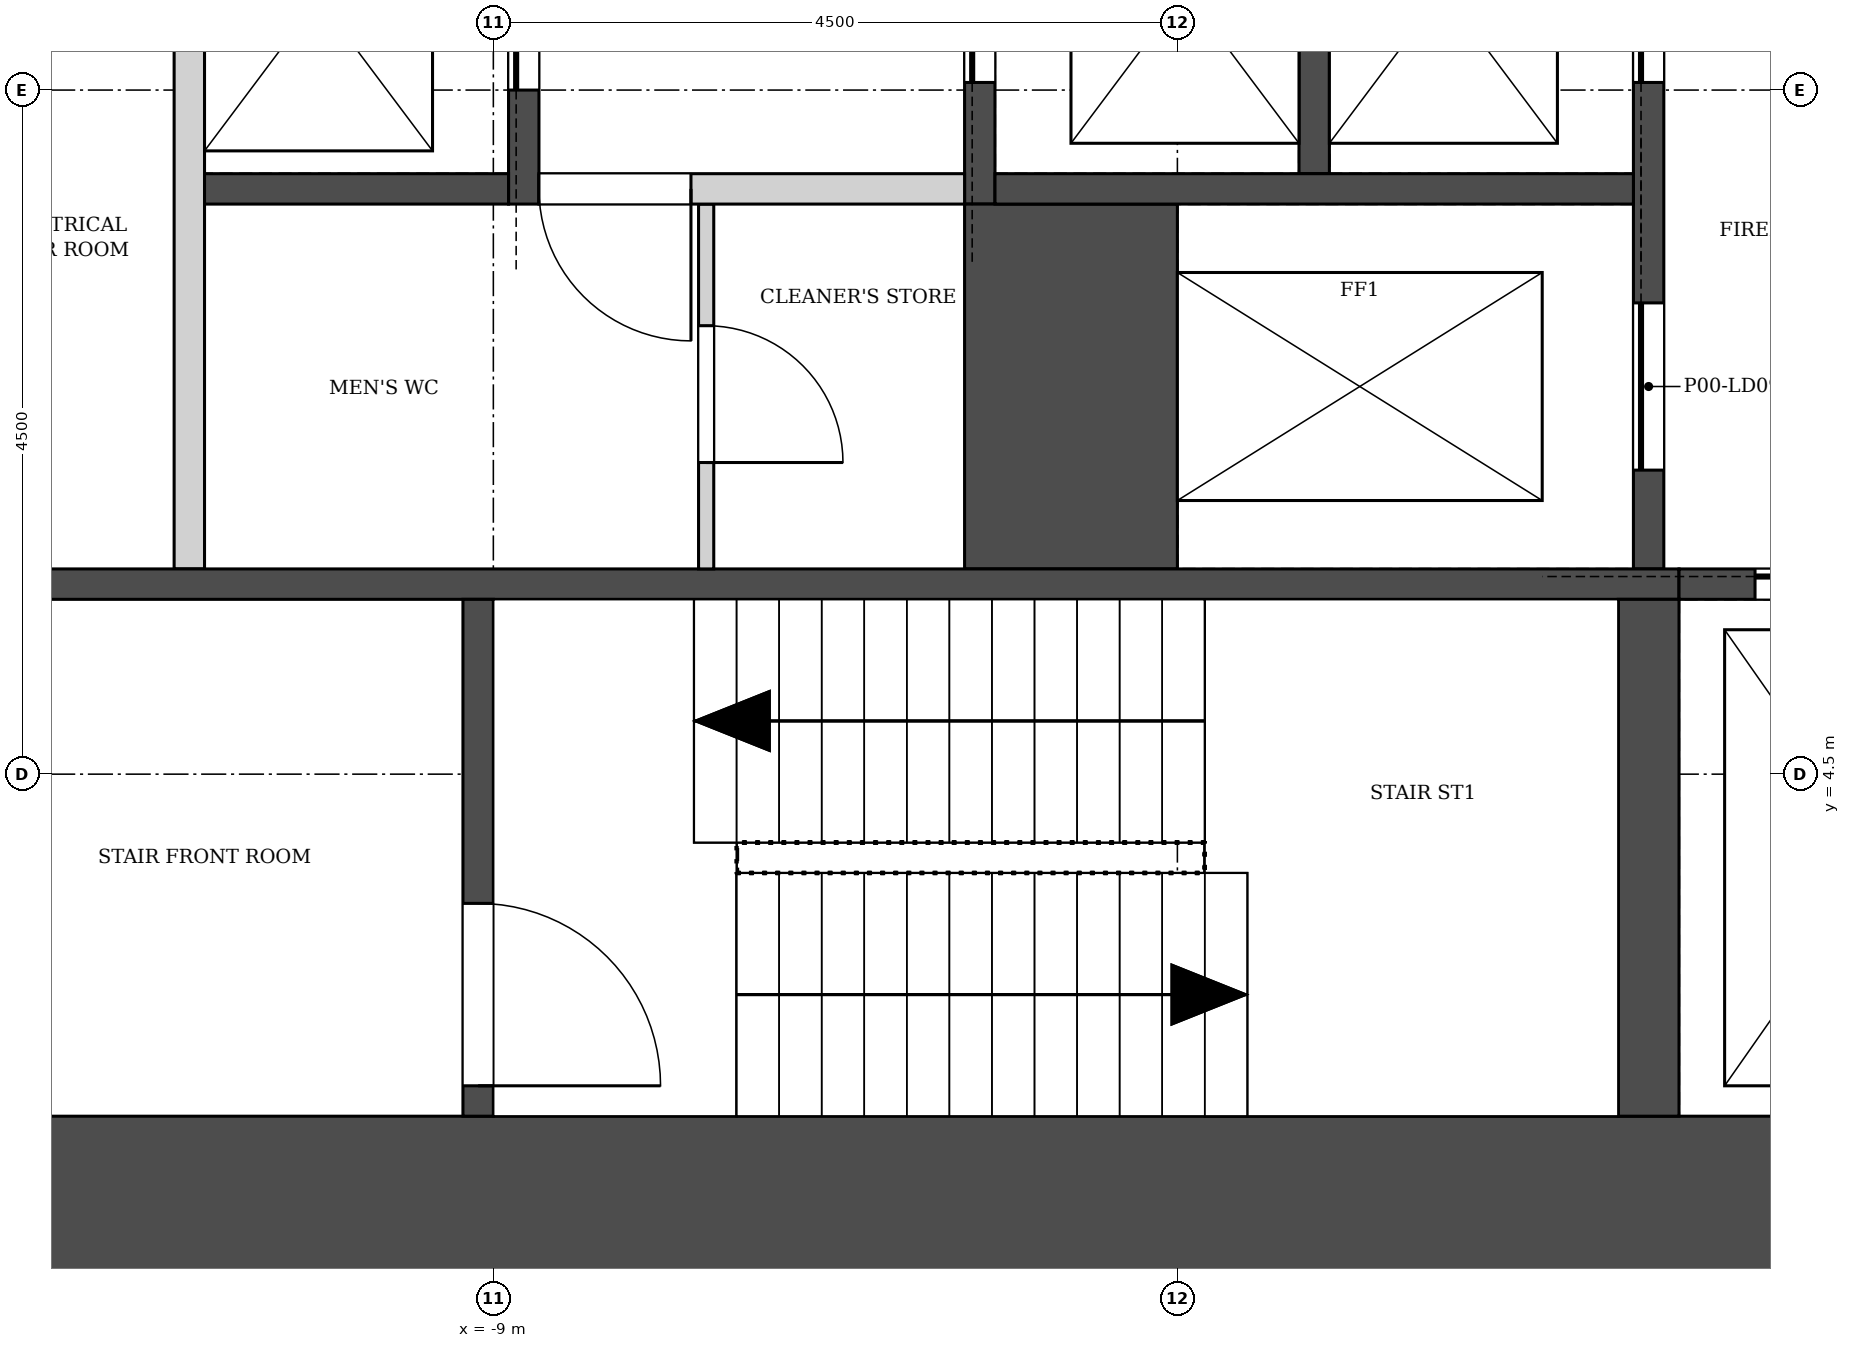
"""IFC4 building model, lengths in metres.
Left out: names, types, materials, properties, quantities, classifications, styles, units other than length and angle.
Written with IfcOpenShell. Run it as: python <this file> out.ifc"""

import sys

from ifc_helpers import new_model, si_unit, direction, frame, frame_2d, origin, place, context, subcontext, project, spatial, rectangle, extrude, element, fill, save


model = new_model("IFC4")
c1 = context("Model", 3, precision=1e-05, world=origin(), true_north=direction((0.0, 1.0)))
c2 = subcontext(c1, "Body", "Model", "MODEL_VIEW")
j1 = project(units=[si_unit("LENGTHUNIT", "METRE"), si_unit("PLANEANGLEUNIT", "RADIAN")], contexts=[c1])
p1 = place(None, origin())
s1 = spatial("IfcSite", under=j1, at=p1, CompositionType="ELEMENT")
p2 = place(p1, origin())
s2 = spatial("IfcBuilding", under=s1, at=p2, CompositionType="ELEMENT")
p3 = place(p2, origin())
s3 = spatial("IfcBuildingStorey", under=s2, at=p3, CompositionType="ELEMENT", Elevation=0.0)
p4 = place(p3, frame((-14.0, 1.55, 0.0), z_axis=(0.0, 0.0, 1.0), x_axis=(1.0, 0.0, 0.0)))
e1 = element("IfcWall", 1, at=p4, inside=s3, PredefinedType="SHEAR", context=c2, shape_type="SweptSolid", body=[
    extrude(rectangle(XDim=28.0, YDim=1.4, at=frame_2d((14.0, 0.0))), origin(), (0.0, 0.0, 1.0), 8.0),
])
p5 = place(p3, frame((-11.0, 5.85, 0.0), z_axis=(0.0, 0.0, 1.0), x_axis=(0.0, 1.0, 0.0)))
e2 = element("IfcWall", 2, at=p5, inside=s3, PredefinedType="SOLIDWALL", context=c2, shape_type="SweptSolid", body=[
    extrude(rectangle(XDim=7.4, YDim=0.2, at=frame_2d((3.7, 0.0))), origin(), (0.0, 0.0, 1.0), 7.7),
])
p6 = place(p3, frame((-8.8, 8.25, -0.4), z_axis=(0.0, 0.0, 1.0), x_axis=(0.0, 1.0, 0.0)))
e3 = element("IfcWall", 3, at=p6, inside=s3, PredefinedType="SOLIDWALL", context=c2, shape_type="SweptSolid", body=[
    extrude(rectangle(XDim=5.2, YDim=0.2, at=frame_2d((2.6, 0.0))), origin(), (0.0, 0.0, 1.0), 8.1),
])
p7 = place(p6, frame((0.75, 0.0, 0.4)))
e4 = element("IfcOpeningElement", 4, at=p7, cuts=e3, PredefinedType="OPENING", context=c2, shape_type="SweptSolid", body=[
    extrude(rectangle(XDim=1.2, YDim=2.1, at=frame_2d((0.6, 1.05))), frame((0.0, 0.11, 0.0), z_axis=(0.0, -1.0, 0.0), x_axis=(1.0, 0.0, 0.0)), (0.0, 0.0, 1.0), 0.22),
])
p8 = place(p6, frame((3.25, 0.0, 0.4)))
e5 = element("IfcOpeningElement", 5, at=p8, cuts=e3, PredefinedType="OPENING", context=c2, shape_type="SweptSolid", body=[
    extrude(rectangle(XDim=1.2, YDim=2.1, at=frame_2d((0.6, 1.05))), frame((0.0, 0.11, 0.0), z_axis=(0.0, -1.0, 0.0), x_axis=(1.0, 0.0, 0.0)), (0.0, 0.0, 1.0), 0.22),
])
p9 = place(p3, frame((-5.8, 8.25, -0.4), z_axis=(0.0, 0.0, 1.0), x_axis=(0.0, 1.0, 0.0)))
e6 = element("IfcWall", 6, at=p9, inside=s3, PredefinedType="SOLIDWALL", context=c2, shape_type="SweptSolid", body=[
    extrude(rectangle(XDim=8.0, YDim=0.2, at=frame_2d((4.0, 0.0))), origin(), (0.0, 0.0, 1.0), 8.1),
])
p10 = place(p9, frame((0.8, 0.0, 0.4)))
e7 = element("IfcOpeningElement", 7, at=p10, cuts=e6, PredefinedType="OPENING", context=c2, shape_type="SweptSolid", body=[
    extrude(rectangle(XDim=1.2, YDim=2.1, at=frame_2d((0.6, 1.05))), frame((0.0, 0.11, 0.0), z_axis=(0.0, -1.0, 0.0), x_axis=(1.0, 0.0, 0.0)), (0.0, 0.0, 1.0), 0.22),
])
p11 = place(p9, frame((3.4, 0.0, 0.4)))
e8 = element("IfcOpeningElement", 8, at=p11, cuts=e6, PredefinedType="OPENING", context=c2, shape_type="SweptSolid", body=[
    extrude(rectangle(XDim=1.2, YDim=2.1, at=frame_2d((0.6, 1.05))), frame((0.0, 0.11, 0.0), z_axis=(0.0, -1.0, 0.0), x_axis=(1.0, 0.0, 0.0)), (0.0, 0.0, 1.0), 0.22),
])
p12 = place(p9, frame((6.0, 0.0, 0.4)))
e9 = element("IfcOpeningElement", 9, at=p12, cuts=e6, PredefinedType="OPENING", context=c2, shape_type="SweptSolid", body=[
    extrude(rectangle(XDim=1.2, YDim=2.1, at=frame_2d((0.6, 1.05))), frame((0.0, 0.11, 0.0), z_axis=(0.0, -1.0, 0.0), x_axis=(1.0, 0.0, 0.0)), (0.0, 0.0, 1.0), 0.22),
])
p13 = place(p3, frame((-3.6, 8.45, -0.4), z_axis=(0.0, 0.0, 1.0), x_axis=(0.0, 1.0, 0.0)))
e10 = element("IfcWall", 10, at=p13, inside=s3, PredefinedType="SOLIDWALL", context=c2, shape_type="SweptSolid", body=[
    extrude(rectangle(XDim=7.8, YDim=0.2, at=frame_2d((3.9, 0.0))), origin(), (0.0, 0.0, 1.0), 8.1),
])
p14 = place(p3, frame((-1.4, 5.85, -0.4), z_axis=(0.0, 0.0, 1.0), x_axis=(0.0, 1.0, 0.0)))
e11 = element("IfcWall", 11, at=p14, inside=s3, PredefinedType="SOLIDWALL", context=c2, shape_type="SweptSolid", body=[
    extrude(rectangle(XDim=11.75, YDim=0.2, at=frame_2d((5.875, 0.0))), origin(), (0.0, 0.0, 1.0), 8.1),
])
p15 = place(p14, frame((3.2, 0.0, 0.4)))
e12 = element("IfcOpeningElement", 12, at=p15, cuts=e11, PredefinedType="OPENING", context=c2, shape_type="SweptSolid", body=[
    extrude(rectangle(XDim=1.2, YDim=2.1, at=frame_2d((0.6, 1.05))), frame((0.0, 0.11, 0.0), z_axis=(0.0, -1.0, 0.0), x_axis=(1.0, 0.0, 0.0)), (0.0, 0.0, 1.0), 0.22),
])
p16 = place(p14, frame((5.7, 0.0, 0.4)))
e13 = element("IfcOpeningElement", 13, at=p16, cuts=e11, PredefinedType="OPENING", context=c2, shape_type="SweptSolid", body=[
    extrude(rectangle(XDim=1.4, YDim=2.1, at=frame_2d((0.7, 1.05))), frame((0.0, 0.11, 0.0), z_axis=(0.0, -1.0, 0.0), x_axis=(1.0, 0.0, 0.0)), (0.0, 0.0, 1.0), 0.22),
])
p17 = place(p14, frame((8.3, 0.0, 0.4)))
e14 = element("IfcOpeningElement", 14, at=p17, cuts=e11, PredefinedType="OPENING", context=c2, shape_type="SweptSolid", body=[
    extrude(rectangle(XDim=1.4, YDim=2.1, at=frame_2d((0.7, 1.05))), frame((0.0, 0.11, 0.0), z_axis=(0.0, -1.0, 0.0), x_axis=(1.0, 0.0, 0.0)), (0.0, 0.0, 1.0), 0.22),
])
p18 = place(p14, frame((0.65, 0.0, 0.4)))
e15 = element("IfcOpeningElement", 15, at=p18, cuts=e11, PredefinedType="OPENING", context=c2, shape_type="SweptSolid", body=[
    extrude(rectangle(XDim=1.1, YDim=2.1, at=frame_2d((0.55, 1.05))), frame((0.0, 0.11, 0.0), z_axis=(0.0, -1.0, 0.0), x_axis=(1.0, 0.0, 0.0)), (0.0, 0.0, 1.0), 0.22),
])
p19 = place(p3, frame((-5.2, 5.85, -0.4), z_axis=(0.0, 0.0, 1.0), x_axis=(0.0, 1.0, 0.0)))
e16 = element("IfcWall", 16, at=p19, inside=s3, PredefinedType="SOLIDWALL", context=c2, shape_type="SweptSolid", body=[
    extrude(rectangle(XDim=2.4, YDim=1.4, at=frame_2d((1.2, 0.0))), origin(), (0.0, 0.0, 1.0), 8.1),
])
p20 = place(p3, frame((-10.9, 8.35, -0.4), z_axis=(0.0, 0.0, 1.0), x_axis=(1.0, 0.0, 0.0)))
e17 = element("IfcWall", 17, at=p20, inside=s3, PredefinedType="SOLIDWALL", context=c2, shape_type="SweptSolid", body=[
    extrude(rectangle(XDim=2.0, YDim=0.2, at=frame_2d((1.0, 0.0))), origin(), (0.0, 0.0, 1.0), 8.1),
])
p21 = place(p3, frame((-5.7, 8.35, -0.4), z_axis=(0.0, 0.0, 1.0), x_axis=(1.0, 0.0, 0.0)))
e18 = element("IfcWall", 18, at=p21, inside=s3, PredefinedType="SOLIDWALL", context=c2, shape_type="SweptSolid", body=[
    extrude(rectangle(XDim=4.2, YDim=0.2, at=frame_2d((2.1, 0.0))), origin(), (0.0, 0.0, 1.0), 8.1),
])
p22 = place(p3, frame((-12.6, 5.75, -0.4), z_axis=(0.0, 0.0, 1.0), x_axis=(1.0, 0.0, 0.0)))
e19 = element("IfcWall", 19, at=p22, inside=s3, PredefinedType="SOLIDWALL", context=c2, shape_type="SweptSolid", body=[
    extrude(rectangle(XDim=11.4, YDim=0.2, at=frame_2d((5.7, 0.0))), origin(), (0.0, 0.0, 1.0), 8.1),
])
p23 = place(p3, frame((-1.2, 5.75, -0.4), z_axis=(0.0, 0.0, 1.0), x_axis=(1.0, 0.0, 0.0)))
e20 = element("IfcWall", 20, at=p23, inside=s3, PredefinedType="SOLIDWALL", context=c2, shape_type="SweptSolid", body=[
    extrude(rectangle(XDim=2.4, YDim=0.2, at=frame_2d((1.2, 0.0))), origin(), (0.0, 0.0, 1.0), 8.1),
])
p24 = place(p23, frame((0.5, 0.0, 0.4)))
e21 = element("IfcOpeningElement", 21, at=p24, cuts=e20, PredefinedType="OPENING", context=c2, shape_type="SweptSolid", body=[
    extrude(rectangle(XDim=1.4, YDim=2.1, at=frame_2d((0.7, 1.05))), frame((0.0, 0.11, 0.0), z_axis=(0.0, -1.0, 0.0), x_axis=(1.0, 0.0, 0.0)), (0.0, 0.0, 1.0), 0.22),
])
p25 = place(p3, frame((-9.1, 2.25, -0.4), z_axis=(0.0, 0.0, 1.0), x_axis=(0.0, 1.0, 0.0)))
e22 = element("IfcWall", 22, at=p25, inside=s3, PredefinedType="SOLIDWALL", context=c2, shape_type="SweptSolid", body=[
    extrude(rectangle(XDim=3.4, YDim=0.2, at=frame_2d((1.7, 0.0))), origin(), (0.0, 0.0, 1.0), 8.1),
])
p26 = place(p25, frame((0.2, 0.0, 0.4)))
e23 = element("IfcOpeningElement", 23, at=p26, cuts=e22, PredefinedType="OPENING", context=c2, shape_type="SweptSolid", body=[
    extrude(rectangle(XDim=1.2, YDim=2.1, at=frame_2d((0.6, 1.05))), frame((0.0, 0.11, 0.0), z_axis=(0.0, -1.0, 0.0), x_axis=(1.0, 0.0, 0.0)), (0.0, 0.0, 1.0), 0.22),
])
p27 = place(p3, frame((-1.4, 2.25, -0.4), z_axis=(0.0, 0.0, 1.0), x_axis=(0.0, 1.0, 0.0)))
e24 = element("IfcWall", 24, at=p27, inside=s3, PredefinedType="SOLIDWALL", context=c2, shape_type="SweptSolid", body=[
    extrude(rectangle(XDim=3.4, YDim=0.4, at=frame_2d((1.7, 0.0))), origin(), (0.0, 0.0, 1.0), 8.1),
])
p28 = place(p3, frame((-7.6, 5.85, 0.0), z_axis=(0.0, 0.0, 1.0), x_axis=(0.0, 1.0, 0.0)))
e25 = element("IfcWall", 25, at=p28, inside=s3, PredefinedType="PARTITIONING", context=c2, shape_type="SweptSolid", body=[
    extrude(rectangle(XDim=2.4, YDim=0.1, at=frame_2d((1.2, 0.0))), origin(), (0.0, 0.0, 1.0), 7.7),
])
p29 = place(p28, frame((0.7, 0.0, 0.0)))
e26 = element("IfcOpeningElement", 26, at=p29, cuts=e25, PredefinedType="OPENING", context=c2, shape_type="SweptSolid", body=[
    extrude(rectangle(XDim=0.9, YDim=2.1, at=frame_2d((0.45, 1.05))), frame((0.0, 0.06, 0.0), z_axis=(0.0, -1.0, 0.0), x_axis=(1.0, 0.0, 0.0)), (0.0, 0.0, 1.0), 0.12),
])
p30 = place(p3, frame((-8.7, 8.35, 0.0), z_axis=(0.0, 0.0, 1.0), x_axis=(1.0, 0.0, 0.0)))
e27 = element("IfcWall", 27, at=p30, inside=s3, PredefinedType="SOLIDWALL", context=c2, shape_type="SweptSolid", body=[
    extrude(rectangle(XDim=2.8, YDim=0.2, at=frame_2d((1.4, 0.0))), origin(), (0.0, 0.0, 1.0), 7.7),
])
p31 = place(p30, origin())
e28 = element("IfcOpeningElement", 28, at=p31, cuts=e27, PredefinedType="OPENING", context=c2, shape_type="SweptSolid", body=[
    extrude(rectangle(XDim=1.0, YDim=2.1, at=frame_2d((0.5, 1.05))), frame((0.0, 0.11, 0.0), z_axis=(0.0, -1.0, 0.0), x_axis=(1.0, 0.0, 0.0)), (0.0, 0.0, 1.0), 0.22),
])
p32 = place(p7, origin())
e29 = element("IfcDoor", 29, at=p32, inside=s3, OperationType="SLIDING_TO_LEFT", PredefinedType="DOOR", context=c2, shape_type="SweptSolid", body=[
    extrude(rectangle(XDim=1.2, YDim=2.1, at=frame_2d((0.6, 1.05))), frame((0.0, 0.025, 0.0), z_axis=(0.0, -1.0, 0.0), x_axis=(1.0, 0.0, 0.0)), (0.0, 0.0, 1.0), 0.05),
])
fill(e4, e29)
p33 = place(p10, origin())
e30 = element("IfcDoor", 30, at=p33, inside=s3, OperationType="SLIDING_TO_LEFT", PredefinedType="DOOR", context=c2, shape_type="SweptSolid", body=[
    extrude(rectangle(XDim=1.2, YDim=2.1, at=frame_2d((0.6, 1.05))), frame((0.0, 0.025, 0.0), z_axis=(0.0, -1.0, 0.0), x_axis=(1.0, 0.0, 0.0)), (0.0, 0.0, 1.0), 0.05),
])
fill(e7, e30)
p34 = place(p15, origin())
e31 = element("IfcDoor", 31, at=p34, inside=s3, OperationType="SLIDING_TO_LEFT", PredefinedType="DOOR", context=c2, shape_type="SweptSolid", body=[
    extrude(rectangle(XDim=1.2, YDim=2.1, at=frame_2d((0.6, 1.05))), frame((0.0, 0.025, 0.0), z_axis=(0.0, -1.0, 0.0), x_axis=(1.0, 0.0, 0.0)), (0.0, 0.0, 1.0), 0.05),
])
fill(e12, e31)
p35 = place(p18, origin())
e32 = element("IfcDoor", 32, at=p35, inside=s3, OperationType="SLIDING_TO_RIGHT", PredefinedType="DOOR", context=c2, shape_type="SweptSolid", body=[
    extrude(rectangle(XDim=1.1, YDim=2.1, at=frame_2d((0.55, 1.05))), frame((0.0, 0.025, 0.0), z_axis=(0.0, -1.0, 0.0), x_axis=(1.0, 0.0, 0.0)), (0.0, 0.0, 1.0), 0.05),
])
fill(e15, e32)
p36 = place(p24, origin())
e33 = element("IfcDoor", 33, at=p36, inside=s3, OperationType="SLIDING_TO_LEFT", PredefinedType="DOOR", context=c2, shape_type="SweptSolid", body=[
    extrude(rectangle(XDim=1.4, YDim=2.1, at=frame_2d((0.7, 1.05))), frame((0.0, 0.025, 0.0), z_axis=(0.0, -1.0, 0.0), x_axis=(1.0, 0.0, 0.0)), (0.0, 0.0, 1.0), 0.05),
])
fill(e21, e33)
p37 = place(p31, frame((1.0, 0.0, 0.0), z_axis=(0.0, 0.0, 1.0), x_axis=(-1.0, 0.0, 0.0)))
e34 = element("IfcDoor", 34, at=p37, inside=s3, OperationType="SINGLE_SWING_LEFT", PredefinedType="DOOR", context=c2, shape_type="SweptSolid", body=[
    extrude(rectangle(XDim=1.0, YDim=2.1, at=frame_2d((0.5, 1.05))), frame((0.0, 0.025, 0.0), z_axis=(0.0, -1.0, 0.0), x_axis=(1.0, 0.0, 0.0)), (0.0, 0.0, 1.0), 0.05),
])
fill(e28, e34)
p38 = place(p29, frame((0.9, 0.0, 0.0), z_axis=(0.0, 0.0, 1.0), x_axis=(-1.0, 0.0, 0.0)))
e35 = element("IfcDoor", 35, at=p38, inside=s3, OperationType="SINGLE_SWING_RIGHT", PredefinedType="DOOR", context=c2, shape_type="SweptSolid", body=[
    extrude(rectangle(XDim=0.9, YDim=2.1, at=frame_2d((0.45, 1.05))), frame((0.0, 0.025, 0.0), z_axis=(0.0, -1.0, 0.0), x_axis=(1.0, 0.0, 0.0)), (0.0, 0.0, 1.0), 0.05),
])
fill(e26, e35)
p39 = place(p26, frame((1.2, 0.0, 0.0), z_axis=(0.0, 0.0, 1.0), x_axis=(-1.0, 0.0, 0.0)))
e36 = element("IfcDoor", 36, at=p39, inside=s3, OperationType="SINGLE_SWING_RIGHT", PredefinedType="DOOR", context=c2, shape_type="SweptSolid", body=[
    extrude(rectangle(XDim=1.2, YDim=2.1, at=frame_2d((0.6, 1.05))), frame((0.0, 0.025, 0.0), z_axis=(0.0, -1.0, 0.0), x_axis=(1.0, 0.0, 0.0)), (0.0, 0.0, 1.0), 0.05),
])
fill(e23, e36)
save(model, sys.argv[1])
